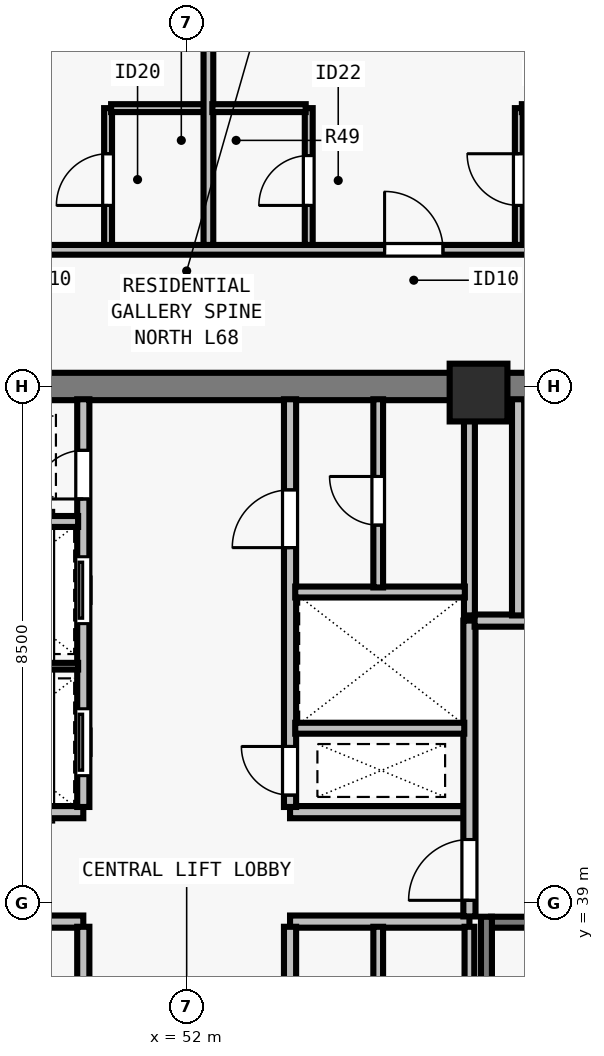
"""IFC4 building model, lengths in metres.
Left out: names, types, materials, properties, quantities, classifications, styles, units other than length and angle.
Written with IfcOpenShell. Run it as: python <this file> out.ifc"""

import sys

from ifc_helpers import new_model, si_unit, direction, frame, frame_2d, origin, origin_2d, place, context, subcontext, project, spatial, rectangle, extrude, element, fill, save


model = new_model("IFC4")
c1 = context("Model", 3, precision=1e-05, world=origin(), true_north=direction((0.0, 1.0)))
c2 = subcontext(c1, "Body", "Model", "MODEL_VIEW")
j1 = project(units=[si_unit("LENGTHUNIT", "METRE"), si_unit("PLANEANGLEUNIT", "RADIAN")], contexts=[c1])
p1 = place(None, origin())
s1 = spatial("IfcSite", under=j1, at=p1, CompositionType="ELEMENT")
p2 = place(p1, origin())
s2 = spatial("IfcBuilding", under=s1, at=p2, CompositionType="ELEMENT")
p3 = place(p2, frame((0.0, 0.0, 248.0)))
s3 = spatial("IfcBuildingStorey", under=s2, at=p3, CompositionType="ELEMENT", Elevation=248.0)
p4 = place(p3, frame((56.8, 47.4, 0.0), z_axis=(0.0, 0.0, 1.0), x_axis=(1.0, 0.0, 0.0)))
e1 = element("IfcColumn", 1, at=p4, inside=s3, PredefinedType="COLUMN", context=c2, shape_type="SweptSolid", body=[
    extrude(rectangle(XDim=0.95, YDim=0.95, at=origin_2d()), origin(), (0.0, 0.0, 1.0), 3.5),
])
p5 = place(p3, frame((43.275, 47.5, 0.0), z_axis=(0.0, 0.0, 1.0), x_axis=(1.0, 0.0, 0.0)))
e2 = element("IfcWall", 2, at=p5, inside=s3, PredefinedType="SHEAR", context=c2, shape_type="SweptSolid", body=[
    extrude(rectangle(XDim=17.45, YDim=0.45, at=frame_2d((8.725, 0.0))), origin(), (0.0, 0.0, 1.0), 3.29),
])
for number, where, z_axis, x_axis in (
    (3, (47.35, 38.7, 0.0), (0.0, 0.0, 1.0), (1.0, 0.0, 0.0)),
    (4, (47.35, 40.5, 0.0), (0.0, 0.0, 1.0), (1.0, 0.0, 0.0)),
    (5, (53.7, 38.7, 0.0), (0.0, 0.0, 1.0), (1.0, 0.0, 0.0)),
    (6, (53.7, 40.5, 0.0), (0.0, 0.0, 1.0), (1.0, 0.0, 0.0)),
):
    element("IfcWall", number, at=place(p3, frame(where, z_axis=z_axis, x_axis=x_axis)), inside=s3, PredefinedType="SOLIDWALL", context=c2, shape_type="SweptSolid", body=[
        extrude(rectangle(XDim=2.95, YDim=0.2, at=frame_2d((1.475, 0.0))), origin(), (0.0, 0.0, 1.0), 3.29),
    ])
p6 = place(p3, frame((50.3, 30.71, 0.0), z_axis=(0.0, 0.0, 1.0), x_axis=(0.0, 1.0, 0.0)))
e7 = element("IfcWall", 7, at=p6, inside=s3, PredefinedType="SOLIDWALL", context=c2, shape_type="SweptSolid", body=[
    extrude(rectangle(XDim=7.905, YDim=0.2, at=frame_2d((3.953, 0.0))), origin(), (0.0, 0.0, 1.0), 3.29),
])
p7 = place(p6, frame((2.14, 0.0, 0.0)))
e8 = element("IfcOpeningElement", 8, at=p7, cuts=e7, PredefinedType="OPENING", context=c2, shape_type="SweptSolid", body=[
    extrude(rectangle(XDim=0.95, YDim=2.12, at=frame_2d((0.475, 1.06))), frame((0.0, 0.11, 0.0), z_axis=(0.0, -1.0, 0.0), x_axis=(1.0, 0.0, 0.0)), (0.0, 0.0, 1.0), 0.22),
])
p8 = place(p3, frame((53.7, 30.71, 0.0), z_axis=(0.0, 0.0, 1.0), x_axis=(0.0, 1.0, 0.0)))
e9 = element("IfcWall", 9, at=p8, inside=s3, PredefinedType="SOLIDWALL", context=c2, shape_type="SweptSolid", body=[
    extrude(rectangle(XDim=7.905, YDim=0.2, at=frame_2d((3.953, 0.0))), origin(), (0.0, 0.0, 1.0), 3.29),
])
p9 = place(p8, frame((2.14, 0.0, 0.0)))
e10 = element("IfcOpeningElement", 10, at=p9, cuts=e9, PredefinedType="OPENING", context=c2, shape_type="SweptSolid", body=[
    extrude(rectangle(XDim=0.95, YDim=2.12, at=frame_2d((0.475, 1.06))), frame((0.0, 0.11, 0.0), z_axis=(0.0, -1.0, 0.0), x_axis=(1.0, 0.0, 0.0)), (0.0, 0.0, 1.0), 0.22),
])
p10 = place(p3, frame((50.3, 40.585, 0.0), z_axis=(0.0, 0.0, 1.0), x_axis=(0.0, 1.0, 0.0)))
e11 = element("IfcWall", 11, at=p10, inside=s3, PredefinedType="SOLIDWALL", context=c2, shape_type="SweptSolid", body=[
    extrude(rectangle(XDim=6.705, YDim=0.2, at=frame_2d((3.353, 0.0))), origin(), (0.0, 0.0, 1.0), 3.29),
])
p11 = place(p10, frame((0.515, 0.0, 0.0)))
e12 = element("IfcOpeningElement", 12, at=p11, cuts=e11, PredefinedType="OPENING", context=c2, shape_type="SweptSolid", body=[
    extrude(rectangle(XDim=1.1, YDim=2.2, at=frame_2d((0.55, 1.1))), frame((0.0, 0.11, 0.0), z_axis=(0.0, -1.0, 0.0), x_axis=(1.0, 0.0, 0.0)), (0.0, 0.0, 1.0), 0.22),
])
p12 = place(p10, frame((3.015, 0.0, 0.0)))
e13 = element("IfcOpeningElement", 13, at=p12, cuts=e11, PredefinedType="OPENING", context=c2, shape_type="SweptSolid", body=[
    extrude(rectangle(XDim=1.1, YDim=2.2, at=frame_2d((0.55, 1.1))), frame((0.0, 0.11, 0.0), z_axis=(0.0, -1.0, 0.0), x_axis=(1.0, 0.0, 0.0)), (0.0, 0.0, 1.0), 0.22),
])
p13 = place(p10, frame((5.065, 0.0, 0.0)))
e14 = element("IfcOpeningElement", 14, at=p13, cuts=e11, PredefinedType="OPENING", context=c2, shape_type="SweptSolid", body=[
    extrude(rectangle(XDim=0.8, YDim=2.08, at=frame_2d((0.4, 1.04))), frame((0.0, 0.11, 0.0), z_axis=(0.0, -1.0, 0.0), x_axis=(1.0, 0.0, 0.0)), (0.0, 0.0, 1.0), 0.22),
])
p14 = place(p3, frame((53.7, 40.585, 0.0), z_axis=(0.0, 0.0, 1.0), x_axis=(0.0, 1.0, 0.0)))
e15 = element("IfcWall", 15, at=p14, inside=s3, PredefinedType="SOLIDWALL", context=c2, shape_type="SweptSolid", body=[
    extrude(rectangle(XDim=6.705, YDim=0.2, at=frame_2d((3.353, 0.0))), origin(), (0.0, 0.0, 1.0), 3.29),
])
p15 = place(p14, frame((0.195, 0.0, 0.0)))
e16 = element("IfcOpeningElement", 16, at=p15, cuts=e15, PredefinedType="OPENING", context=c2, shape_type="SweptSolid", body=[
    extrude(rectangle(XDim=0.8, YDim=2.08, at=frame_2d((0.4, 1.04))), frame((0.0, 0.11, 0.0), z_axis=(0.0, -1.0, 0.0), x_axis=(1.0, 0.0, 0.0)), (0.0, 0.0, 1.0), 0.22),
])
p16 = place(p14, frame((4.265, 0.0, 0.0)))
e17 = element("IfcOpeningElement", 17, at=p16, cuts=e15, PredefinedType="OPENING", context=c2, shape_type="SweptSolid", body=[
    extrude(rectangle(XDim=0.95, YDim=2.12, at=frame_2d((0.475, 1.06))), frame((0.0, 0.11, 0.0), z_axis=(0.0, -1.0, 0.0), x_axis=(1.0, 0.0, 0.0)), (0.0, 0.0, 1.0), 0.22),
])
p17 = place(p3, frame((56.65, 38.785, 0.0), z_axis=(0.0, 0.0, 1.0), x_axis=(0.0, 1.0, 0.0)))
e18 = element("IfcWall", 18, at=p17, inside=s3, PredefinedType="SOLIDWALL", context=c2, shape_type="SweptSolid", body=[
    extrude(rectangle(XDim=4.865, YDim=0.2, at=frame_2d((2.433, 0.0))), origin(), (0.0, 0.0, 1.0), 3.29),
])
p18 = place(p17, frame((0.265, 0.0, 0.0)))
e19 = element("IfcOpeningElement", 19, at=p18, cuts=e18, PredefinedType="OPENING", context=c2, shape_type="SweptSolid", body=[
    extrude(rectangle(XDim=1.0, YDim=2.15, at=frame_2d((0.5, 1.075))), frame((0.0, 0.11, 0.0), z_axis=(0.0, -1.0, 0.0), x_axis=(1.0, 0.0, 0.0)), (0.0, 0.0, 1.0), 0.22),
])
p19 = place(p3, frame((56.735, 43.65, 0.0), z_axis=(0.0, 0.0, 1.0), x_axis=(1.0, 0.0, 0.0)))
e20 = element("IfcWall", 20, at=p19, inside=s3, PredefinedType="SOLIDWALL", context=c2, shape_type="SweptSolid", body=[
    extrude(rectangle(XDim=3.555, YDim=0.2, at=frame_2d((1.777, 0.0))), origin(), (0.0, 0.0, 1.0), 3.29),
])
p20 = place(p19, frame((1.295, 0.0, 0.0)))
e21 = element("IfcOpeningElement", 21, at=p20, cuts=e20, PredefinedType="OPENING", context=c2, shape_type="SweptSolid", body=[
    extrude(rectangle(XDim=1.1, YDim=2.2, at=frame_2d((0.55, 1.1))), frame((0.0, 0.11, 0.0), z_axis=(0.0, -1.0, 0.0), x_axis=(1.0, 0.0, 0.0)), (0.0, 0.0, 1.0), 0.22),
])
p21 = place(p3, frame((57.45, 43.735, 0.0), z_axis=(0.0, 0.0, 1.0), x_axis=(0.0, 1.0, 0.0)))
e22 = element("IfcWall", 22, at=p21, inside=s3, PredefinedType="SOLIDWALL", context=c2, shape_type="SweptSolid", body=[
    extrude(rectangle(XDim=3.555, YDim=0.2, at=frame_2d((1.777, 0.0))), origin(), (0.0, 0.0, 1.0), 3.29),
])
p22 = place(p3, frame((56.65, 30.71, 0.0), z_axis=(0.0, 0.0, 1.0), x_axis=(0.0, 1.0, 0.0)))
e23 = element("IfcWall", 23, at=p22, inside=s3, PredefinedType="PARTITIONING", context=c2, shape_type="SweptSolid", body=[
    extrude(rectangle(XDim=7.905, YDim=0.16, at=frame_2d((3.953, 0.0))), origin(), (0.0, 0.0, 1.0), 3.29),
])
p23 = place(p3, frame((55.15, 30.71, 0.0), z_axis=(0.0, 0.0, 1.0), x_axis=(0.0, 1.0, 0.0)))
e24 = element("IfcWall", 24, at=p23, inside=s3, PredefinedType="PARTITIONING", context=c2, shape_type="SweptSolid", body=[
    extrude(rectangle(XDim=7.905, YDim=0.16, at=frame_2d((3.953, 0.0))), origin(), (0.0, 0.0, 1.0), 3.29),
])
p24 = place(p23, frame((3.54, 0.0, 0.0)))
e25 = element("IfcOpeningElement", 25, at=p24, cuts=e24, PredefinedType="OPENING", context=c2, shape_type="SweptSolid", body=[
    extrude(rectangle(XDim=0.85, YDim=2.12, at=frame_2d((0.425, 1.06))), frame((0.0, 0.09, 0.0), z_axis=(0.0, -1.0, 0.0), x_axis=(1.0, 0.0, 0.0)), (0.0, 0.0, 1.0), 0.18),
])
p25 = place(p3, frame((47.435, 42.9, 0.0), z_axis=(0.0, 0.0, 1.0), x_axis=(1.0, 0.0, 0.0)))
e26 = element("IfcWall", 26, at=p25, inside=s3, PredefinedType="PARTITIONING", context=c2, shape_type="SweptSolid", body=[
    extrude(rectangle(XDim=2.78, YDim=0.11, at=frame_2d((1.39, 0.0))), origin(), (0.0, 0.0, 1.0), 3.29),
])
p26 = place(p3, frame((47.425, 45.28, 0.0), z_axis=(0.0, 0.0, 1.0), x_axis=(1.0, 0.0, 0.0)))
e27 = element("IfcWall", 27, at=p26, inside=s3, PredefinedType="SOLIDWALL", context=c2, shape_type="SweptSolid", body=[
    extrude(rectangle(XDim=2.79, YDim=0.18, at=frame_2d((1.395, 0.0))), origin(), (0.0, 0.0, 1.0), 3.29),
])
p27 = place(p3, frame((56.65, 43.735, 0.0), z_axis=(0.0, 0.0, 1.0), x_axis=(0.0, 1.0, 0.0)))
e28 = element("IfcWall", 28, at=p27, inside=s3, PredefinedType="SOLIDWALL", context=c2, shape_type="SweptSolid", body=[
    extrude(rectangle(XDim=3.555, YDim=0.18, at=frame_2d((1.777, 0.0))), origin(), (0.0, 0.0, 1.0), 3.29),
])
p28 = place(p3, frame((53.785, 41.88, 0.0), z_axis=(0.0, 0.0, 1.0), x_axis=(1.0, 0.0, 0.0)))
e29 = element("IfcWall", 29, at=p28, inside=s3, PredefinedType="SOLIDWALL", context=c2, shape_type="SweptSolid", body=[
    extrude(rectangle(XDim=2.78, YDim=0.18, at=frame_2d((1.39, 0.0))), origin(), (0.0, 0.0, 1.0), 3.29),
])
p29 = place(p3, frame((53.785, 44.12, 0.0), z_axis=(0.0, 0.0, 1.0), x_axis=(1.0, 0.0, 0.0)))
e30 = element("IfcWall", 30, at=p29, inside=s3, PredefinedType="SOLIDWALL", context=c2, shape_type="SweptSolid", body=[
    extrude(rectangle(XDim=2.79, YDim=0.18, at=frame_2d((1.395, 0.0))), origin(), (0.0, 0.0, 1.0), 3.29),
])
p30 = place(p3, frame((55.15, 44.195, 0.0), z_axis=(0.0, 0.0, 1.0), x_axis=(0.0, 1.0, 0.0)))
e31 = element("IfcWall", 31, at=p30, inside=s3, PredefinedType="PARTITIONING", context=c2, shape_type="SweptSolid", body=[
    extrude(rectangle(XDim=3.095, YDim=0.16, at=frame_2d((1.547, 0.0))), origin(), (0.0, 0.0, 1.0), 3.29),
])
p31 = place(p30, frame((1.025, 0.0, 0.0)))
e32 = element("IfcOpeningElement", 32, at=p31, cuts=e31, PredefinedType="OPENING", context=c2, shape_type="SweptSolid", body=[
    extrude(rectangle(XDim=0.8, YDim=2.1, at=frame_2d((0.4, 1.05))), frame((0.0, 0.09, 0.0), z_axis=(0.0, -1.0, 0.0), x_axis=(1.0, 0.0, 0.0)), (0.0, 0.0, 1.0), 0.18),
])
p32 = place(p3, frame((29.805, 49.748, 0.0), z_axis=(0.0, 0.0, 1.0), x_axis=(1.0, 0.0, 0.0)))
e33 = element("IfcWall", 33, at=p32, inside=s3, PredefinedType="PARTITIONING", context=c2, shape_type="SweptSolid", body=[
    extrude(rectangle(XDim=44.39, YDim=0.16, at=frame_2d((22.195, 0.0))), origin(), (0.0, 0.0, 1.0), 2.958),
])
p33 = place(p32, frame((3.494, 0.0, 0.0)))
e34 = element("IfcOpeningElement", 34, at=p33, cuts=e33, PredefinedType="OPENING", context=c2, shape_type="SweptSolid", body=[
    extrude(rectangle(XDim=0.96, YDim=2.18, at=frame_2d((0.48, 1.09))), frame((0.0, 0.09, 0.0), z_axis=(0.0, -1.0, 0.0), x_axis=(1.0, 0.0, 0.0)), (0.0, 0.0, 1.0), 0.18),
])
p34 = place(p32, frame((10.73, 0.0, 0.0)))
e35 = element("IfcOpeningElement", 35, at=p34, cuts=e33, PredefinedType="OPENING", context=c2, shape_type="SweptSolid", body=[
    extrude(rectangle(XDim=0.96, YDim=2.18, at=frame_2d((0.48, 1.09))), frame((0.0, 0.09, 0.0), z_axis=(0.0, -1.0, 0.0), x_axis=(1.0, 0.0, 0.0)), (0.0, 0.0, 1.0), 0.18),
])
p35 = place(p32, frame((18.09, 0.0, 0.0)))
e36 = element("IfcOpeningElement", 36, at=p35, cuts=e33, PredefinedType="OPENING", context=c2, shape_type="SweptSolid", body=[
    extrude(rectangle(XDim=0.96, YDim=2.18, at=frame_2d((0.48, 1.09))), frame((0.0, 0.09, 0.0), z_axis=(0.0, -1.0, 0.0), x_axis=(1.0, 0.0, 0.0)), (0.0, 0.0, 1.0), 0.18),
])
p36 = place(p32, frame((25.45, 0.0, 0.0)))
e37 = element("IfcOpeningElement", 37, at=p36, cuts=e33, PredefinedType="OPENING", context=c2, shape_type="SweptSolid", body=[
    extrude(rectangle(XDim=0.96, YDim=2.18, at=frame_2d((0.48, 1.09))), frame((0.0, 0.09, 0.0), z_axis=(0.0, -1.0, 0.0), x_axis=(1.0, 0.0, 0.0)), (0.0, 0.0, 1.0), 0.18),
])
p37 = place(p32, frame((32.81, 0.0, 0.0)))
e38 = element("IfcOpeningElement", 38, at=p37, cuts=e33, PredefinedType="OPENING", context=c2, shape_type="SweptSolid", body=[
    extrude(rectangle(XDim=0.96, YDim=2.18, at=frame_2d((0.48, 1.09))), frame((0.0, 0.09, 0.0), z_axis=(0.0, -1.0, 0.0), x_axis=(1.0, 0.0, 0.0)), (0.0, 0.0, 1.0), 0.18),
])
p38 = place(p32, frame((40.294, 0.0, 0.0)))
e39 = element("IfcOpeningElement", 39, at=p38, cuts=e33, PredefinedType="OPENING", context=c2, shape_type="SweptSolid", body=[
    extrude(rectangle(XDim=0.96, YDim=2.18, at=frame_2d((0.48, 1.09))), frame((0.0, 0.09, 0.0), z_axis=(0.0, -1.0, 0.0), x_axis=(1.0, 0.0, 0.0)), (0.0, 0.0, 1.0), 0.18),
])
p39 = place(p3, frame((50.708, 49.827, 0.0), z_axis=(0.0, 0.0, 1.0), x_axis=(0.0, 1.0, 0.0)))
e40 = element("IfcWall", 40, at=p39, inside=s3, PredefinedType="PLUMBINGWALL", context=c2, shape_type="SweptSolid", body=[
    extrude(rectangle(XDim=2.25, YDim=0.13, at=frame_2d((1.125, 0.0))), origin(), (0.0, 0.0, 1.0), 3.29),
])
p40 = place(p39, frame((0.65, 0.0, 0.0)))
e41 = element("IfcOpeningElement", 41, at=p40, cuts=e40, PredefinedType="OPENING", context=c2, shape_type="SweptSolid", body=[
    extrude(rectangle(XDim=0.85, YDim=2.1, at=frame_2d((0.425, 1.05))), frame((0.0, 0.075, 0.0), z_axis=(0.0, -1.0, 0.0), x_axis=(1.0, 0.0, 0.0)), (0.0, 0.0, 1.0), 0.15),
])
p41 = place(p3, frame((50.758, 52.077, 0.0), z_axis=(0.0, 0.0, 1.0), x_axis=(1.0, 0.0, 0.0)))
e42 = element("IfcWall", 42, at=p41, inside=s3, PredefinedType="PLUMBINGWALL", context=c2, shape_type="SweptSolid", body=[
    extrude(rectangle(XDim=1.6, YDim=0.13, at=frame_2d((0.8, 0.0))), origin(), (0.0, 0.0, 1.0), 3.29),
])
p42 = place(p3, frame((52.357, 49.827, 0.0), z_axis=(0.0, 0.0, 1.0), x_axis=(0.0, 1.0, 0.0)))
e43 = element("IfcWall", 43, at=p42, inside=s3, PredefinedType="PARTITIONING", context=c2, shape_type="SweptSolid", body=[
    extrude(rectangle(XDim=11.368, YDim=0.16, at=frame_2d((5.684, 0.0))), origin(), (0.0, 0.0, 1.0), 2.958),
])
p43 = place(p3, frame((54.008, 49.827, 0.0), z_axis=(0.0, 0.0, 1.0), x_axis=(0.0, 1.0, 0.0)))
e44 = element("IfcWall", 44, at=p43, inside=s3, PredefinedType="PLUMBINGWALL", context=c2, shape_type="SweptSolid", body=[
    extrude(rectangle(XDim=2.25, YDim=0.13, at=frame_2d((1.125, 0.0))), origin(), (0.0, 0.0, 1.0), 3.29),
])
p44 = place(p43, frame((0.65, 0.0, 0.0)))
e45 = element("IfcOpeningElement", 45, at=p44, cuts=e44, PredefinedType="OPENING", context=c2, shape_type="SweptSolid", body=[
    extrude(rectangle(XDim=0.82, YDim=2.1, at=frame_2d((0.41, 1.05))), frame((0.0, 0.075, 0.0), z_axis=(0.0, -1.0, 0.0), x_axis=(1.0, 0.0, 0.0)), (0.0, 0.0, 1.0), 0.15),
])
p45 = place(p3, frame((52.423, 52.077, 0.0), z_axis=(0.0, 0.0, 1.0), x_axis=(1.0, 0.0, 0.0)))
e46 = element("IfcWall", 46, at=p45, inside=s3, PredefinedType="PLUMBINGWALL", context=c2, shape_type="SweptSolid", body=[
    extrude(rectangle(XDim=1.535, YDim=0.13, at=frame_2d((0.768, 0.0))), origin(), (0.0, 0.0, 1.0), 3.29),
])
p46 = place(p3, frame((57.462, 49.827, 0.0), z_axis=(0.0, 0.0, 1.0), x_axis=(0.0, 1.0, 0.0)))
e47 = element("IfcWall", 47, at=p46, inside=s3, PredefinedType="PLUMBINGWALL", context=c2, shape_type="SweptSolid", body=[
    extrude(rectangle(XDim=2.25, YDim=0.13, at=frame_2d((1.125, 0.0))), origin(), (0.0, 0.0, 1.0), 3.29),
])
p47 = place(p46, frame((0.65, 0.0, 0.0)))
e48 = element("IfcOpeningElement", 48, at=p47, cuts=e47, PredefinedType="OPENING", context=c2, shape_type="SweptSolid", body=[
    extrude(rectangle(XDim=0.85, YDim=2.1, at=frame_2d((0.425, 1.05))), frame((0.0, 0.075, 0.0), z_axis=(0.0, -1.0, 0.0), x_axis=(1.0, 0.0, 0.0)), (0.0, 0.0, 1.0), 0.15),
])
p48 = place(p3, frame((57.512, 52.077, 0.0), z_axis=(0.0, 0.0, 1.0), x_axis=(1.0, 0.0, 0.0)))
e49 = element("IfcWall", 49, at=p48, inside=s3, PredefinedType="PLUMBINGWALL", context=c2, shape_type="SweptSolid", body=[
    extrude(rectangle(XDim=1.6, YDim=0.13, at=frame_2d((0.8, 0.0))), origin(), (0.0, 0.0, 1.0), 3.29),
])
p49 = place(p3, frame((57.005, 38.69, 0.0), z_axis=(0.0, 0.0, 1.0), x_axis=(1.0, 0.0, 0.0)))
e50 = element("IfcWall", 50, at=p49, inside=s3, PredefinedType="SOLIDWALL", context=c2, shape_type="SweptSolid", body=[
    extrude(rectangle(XDim=3.28, YDim=0.18, at=frame_2d((1.64, 0.0))), origin(), (0.0, 0.0, 1.0), 3.29),
])
p50 = place(p49, frame((1.165, 0.0, 0.0)))
e51 = element("IfcOpeningElement", 51, at=p50, cuts=e50, PredefinedType="OPENING", context=c2, shape_type="SweptSolid", body=[
    extrude(rectangle(XDim=0.95, YDim=2.15, at=frame_2d((0.475, 1.075))), frame((0.0, 0.1, 0.0), z_axis=(0.0, -1.0, 0.0), x_axis=(1.0, 0.0, 0.0)), (0.0, 0.0, 1.0), 0.2),
])
p51 = place(p3, frame((56.93, 38.78, 0.0), z_axis=(0.0, 0.0, 1.0), x_axis=(0.0, -1.0, 0.0)))
e52 = element("IfcWall", 52, at=p51, inside=s3, PredefinedType="SOLIDWALL", context=c2, shape_type="SweptSolid", body=[
    extrude(rectangle(XDim=8.067, YDim=0.18, at=frame_2d((4.034, 0.0))), origin(), (0.0, 0.0, 1.0), 3.29),
])
p52 = place(p18, origin())
e53 = element("IfcDoor", 53, at=p52, inside=s3, OperationType="SINGLE_SWING_LEFT", PredefinedType="DOOR", context=c2, shape_type="SweptSolid", body=[
    extrude(rectangle(XDim=1.0, YDim=2.15, at=frame_2d((0.5, 1.075))), frame((0.0, 0.025, 0.0), z_axis=(0.0, -1.0, 0.0), x_axis=(1.0, 0.0, 0.0)), (0.0, 0.0, 1.0), 0.05),
])
fill(e19, e53)
p53 = place(p11, origin())
e54 = element("IfcDoor", 54, at=p53, inside=s3, OperationType="SLIDING_TO_LEFT", PredefinedType="DOOR", context=c2, shape_type="SweptSolid", body=[
    extrude(rectangle(XDim=1.1, YDim=2.2, at=frame_2d((0.55, 1.1))), frame((0.0, 0.025, 0.0), z_axis=(0.0, -1.0, 0.0), x_axis=(1.0, 0.0, 0.0)), (0.0, 0.0, 1.0), 0.05),
])
fill(e12, e54)
p54 = place(p12, origin())
e55 = element("IfcDoor", 55, at=p54, inside=s3, OperationType="SLIDING_TO_LEFT", PredefinedType="DOOR", context=c2, shape_type="SweptSolid", body=[
    extrude(rectangle(XDim=1.1, YDim=2.2, at=frame_2d((0.55, 1.1))), frame((0.0, 0.025, 0.0), z_axis=(0.0, -1.0, 0.0), x_axis=(1.0, 0.0, 0.0)), (0.0, 0.0, 1.0), 0.05),
])
fill(e13, e55)
p55 = place(p13, origin())
e56 = element("IfcDoor", 56, at=p55, inside=s3, OperationType="SINGLE_SWING_LEFT", PredefinedType="DOOR", context=c2, shape_type="SweptSolid", body=[
    extrude(rectangle(XDim=0.8, YDim=2.08, at=frame_2d((0.4, 1.04))), frame((0.0, 0.025, 0.0), z_axis=(0.0, -1.0, 0.0), x_axis=(1.0, 0.0, 0.0)), (0.0, 0.0, 1.0), 0.05),
])
fill(e14, e56)
p56 = place(p15, origin())
e57 = element("IfcDoor", 57, at=p56, inside=s3, OperationType="SINGLE_SWING_RIGHT", PredefinedType="DOOR", context=c2, shape_type="SweptSolid", body=[
    extrude(rectangle(XDim=0.8, YDim=2.08, at=frame_2d((0.4, 1.04))), frame((0.0, 0.025, 0.0), z_axis=(0.0, -1.0, 0.0), x_axis=(1.0, 0.0, 0.0)), (0.0, 0.0, 1.0), 0.05),
])
fill(e16, e57)
p57 = place(p16, origin())
e58 = element("IfcDoor", 58, at=p57, inside=s3, OperationType="SINGLE_SWING_LEFT", PredefinedType="DOOR", context=c2, shape_type="SweptSolid", body=[
    extrude(rectangle(XDim=0.95, YDim=2.12, at=frame_2d((0.475, 1.06))), frame((0.0, 0.025, 0.0), z_axis=(0.0, -1.0, 0.0), x_axis=(1.0, 0.0, 0.0)), (0.0, 0.0, 1.0), 0.05),
])
fill(e17, e58)
p58 = place(p31, origin())
e59 = element("IfcDoor", 59, at=p58, inside=s3, OperationType="SINGLE_SWING_RIGHT", PredefinedType="DOOR", context=c2, shape_type="SweptSolid", body=[
    extrude(rectangle(XDim=0.8, YDim=2.1, at=frame_2d((0.4, 1.05))), frame((0.0, 0.025, 0.0), z_axis=(0.0, -1.0, 0.0), x_axis=(1.0, 0.0, 0.0)), (0.0, 0.0, 1.0), 0.05),
])
fill(e32, e59)
p59 = place(p40, origin())
e60 = element("IfcDoor", 60, at=p59, inside=s3, OperationType="SINGLE_SWING_LEFT", PredefinedType="DOOR", context=c2, shape_type="SweptSolid", body=[
    extrude(rectangle(XDim=0.85, YDim=2.1, at=frame_2d((0.425, 1.05))), frame((0.0, 0.025, 0.0), z_axis=(0.0, -1.0, 0.0), x_axis=(1.0, 0.0, 0.0)), (0.0, 0.0, 1.0), 0.05),
])
fill(e41, e60)
p60 = place(p44, origin())
e61 = element("IfcDoor", 61, at=p60, inside=s3, OperationType="SINGLE_SWING_LEFT", PredefinedType="DOOR", context=c2, shape_type="SweptSolid", body=[
    extrude(rectangle(XDim=0.82, YDim=2.1, at=frame_2d((0.41, 1.05))), frame((0.0, 0.025, 0.0), z_axis=(0.0, -1.0, 0.0), x_axis=(1.0, 0.0, 0.0)), (0.0, 0.0, 1.0), 0.05),
])
fill(e45, e61)
p61 = place(p47, origin())
e62 = element("IfcDoor", 62, at=p61, inside=s3, OperationType="SINGLE_SWING_RIGHT", PredefinedType="DOOR", context=c2, shape_type="SweptSolid", body=[
    extrude(rectangle(XDim=0.85, YDim=2.1, at=frame_2d((0.425, 1.05))), frame((0.0, 0.025, 0.0), z_axis=(0.0, -1.0, 0.0), x_axis=(1.0, 0.0, 0.0)), (0.0, 0.0, 1.0), 0.05),
])
fill(e48, e62)
p62 = place(p36, origin())
e63 = element("IfcDoor", 63, at=p62, inside=s3, OperationType="SINGLE_SWING_LEFT", PredefinedType="DOOR", context=c2, shape_type="SweptSolid", body=[
    extrude(rectangle(XDim=0.96, YDim=2.18, at=frame_2d((0.48, 1.09))), frame((0.0, 0.025, 0.0), z_axis=(0.0, -1.0, 0.0), x_axis=(1.0, 0.0, 0.0)), (0.0, 0.0, 1.0), 0.05),
])
fill(e37, e63)
save(model, sys.argv[1])
